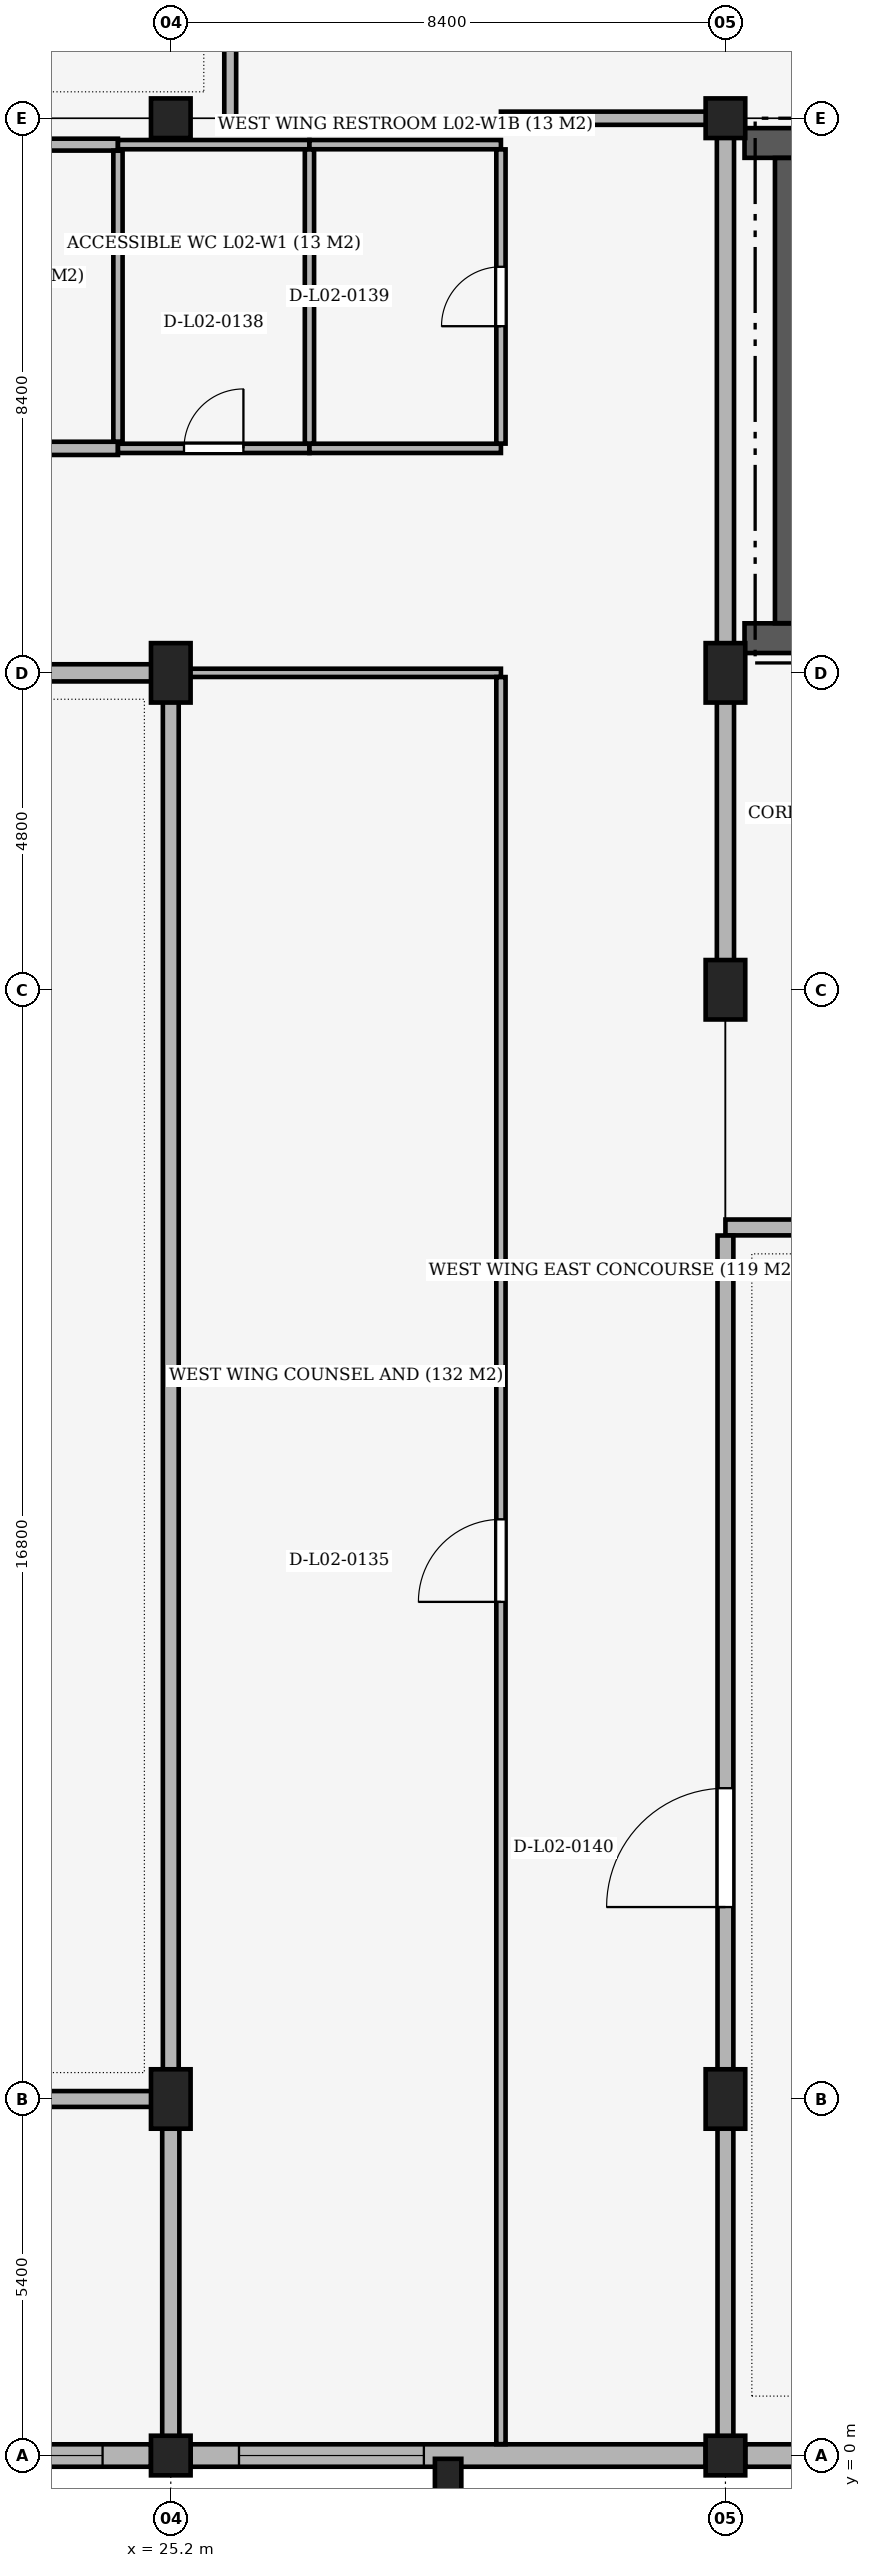
"""IFC4 building model, lengths in metres.
Left out: names, types, materials, properties, quantities, classifications, styles, units other than length and angle.
Written with IfcOpenShell. Run it as: python <this file> out.ifc"""

import sys

from ifc_helpers import new_model, si_unit, direction, frame, frame_2d, origin, origin_2d, place, context, subcontext, project, spatial, rectangle, extrude, element, fill, save


model = new_model("IFC4")
c1 = context("Model", 3, precision=1e-05, world=origin(), true_north=direction((0.0, 1.0)))
c2 = subcontext(c1, "Body", "Model", "MODEL_VIEW")
j1 = project(units=[si_unit("LENGTHUNIT", "METRE"), si_unit("PLANEANGLEUNIT", "RADIAN")], contexts=[c1])
p1 = place(None, origin())
s1 = spatial("IfcSite", under=j1, at=p1, CompositionType="ELEMENT")
p2 = place(p1, origin())
s2 = spatial("IfcBuilding", under=s1, at=p2, CompositionType="ELEMENT")
p3 = place(p2, frame((0.0, 0.0, 10.2)))
s3 = spatial("IfcBuildingStorey", under=s2, at=p3, CompositionType="ELEMENT", Elevation=10.2)
p4 = place(p3, frame((25.2, 0.0, 0.0), z_axis=(0.0, 0.0, 1.0), x_axis=(1.0, 0.0, 0.0)))
e1 = element("IfcColumn", 1, at=p4, inside=s3, PredefinedType="COLUMN", context=c2, shape_type="SweptSolid", body=[
    extrude(rectangle(XDim=0.6, YDim=0.6, at=origin_2d()), origin(), (0.0, 0.0, 1.0), 5.1),
])
for number, where, z_axis, x_axis in (
    (2, (25.2, 5.4, 0.0), (0.0, 0.0, 1.0), (1.0, 0.0, 0.0)),
    (3, (25.2, 27.0, 0.0), (0.0, 0.0, 1.0), (1.0, 0.0, 0.0)),
):
    element("IfcColumn", number, at=place(p3, frame(where, z_axis=z_axis, x_axis=x_axis)), inside=s3, PredefinedType="COLUMN", context=c2, shape_type="SweptSolid", body=[
        extrude(rectangle(XDim=0.6, YDim=0.9, at=origin_2d()), origin(), (0.0, 0.0, 1.0), 5.1),
    ])
for number, where, z_axis, x_axis in (
    (4, (25.2, 35.4, 0.0), (0.0, 0.0, 1.0), (1.0, 0.0, 0.0)),
    (5, (33.6, 0.0, 0.0), (0.0, 0.0, 1.0), (1.0, 0.0, 0.0)),
):
    element("IfcColumn", number, at=place(p3, frame(where, z_axis=z_axis, x_axis=x_axis)), inside=s3, PredefinedType="COLUMN", context=c2, shape_type="SweptSolid", body=[
        extrude(rectangle(XDim=0.6, YDim=0.6, at=origin_2d()), origin(), (0.0, 0.0, 1.0), 5.1),
    ])
for number, where, z_axis, x_axis in (
    (6, (33.6, 5.4, 0.0), (0.0, 0.0, 1.0), (1.0, 0.0, 0.0)),
    (7, (33.6, 22.2, 0.0), (0.0, 0.0, 1.0), (1.0, 0.0, 0.0)),
    (8, (33.6, 27.0, 0.0), (0.0, 0.0, 1.0), (1.0, 0.0, 0.0)),
):
    element("IfcColumn", number, at=place(p3, frame(where, z_axis=z_axis, x_axis=x_axis)), inside=s3, PredefinedType="COLUMN", context=c2, shape_type="SweptSolid", body=[
        extrude(rectangle(XDim=0.6, YDim=0.9, at=origin_2d()), origin(), (0.0, 0.0, 1.0), 5.1),
    ])
p5 = place(p3, frame((33.6, 35.4, 0.0), z_axis=(0.0, 0.0, 1.0), x_axis=(1.0, 0.0, 0.0)))
e9 = element("IfcColumn", 9, at=p5, inside=s3, PredefinedType="COLUMN", context=c2, shape_type="SweptSolid", body=[
    extrude(rectangle(XDim=0.6, YDim=0.6, at=origin_2d()), origin(), (0.0, 0.0, 1.0), 5.1),
])
p6 = place(p3, frame((29.4, -0.35, 0.0), z_axis=(0.0, 0.0, 1.0), x_axis=(1.0, 0.0, 0.0)))
e10 = element("IfcColumn", 10, at=p6, inside=s3, PredefinedType="PILASTER", context=c2, shape_type="SweptSolid", body=[
    extrude(rectangle(XDim=0.4, YDim=0.6, at=origin_2d()), origin(), (0.0, 0.0, 1.0), 5.1),
])
p7 = place(p3, frame((41.7, 0.0, 0.0), z_axis=(0.0, 0.0, 1.0), x_axis=(-1.0, 0.0, 0.0)))
e11 = element("IfcWall", 11, at=p7, inside=s3, PredefinedType="SOLIDWALL", context=c2, shape_type="SweptSolid", body=[
    extrude(rectangle(XDim=7.8, YDim=0.34, at=frame_2d((3.9, 0.0))), origin(), (0.0, 0.0, 1.0), 4.12),
])
p8 = place(p7, frame((2.3, 0.0, 0.75)))
e12 = element("IfcOpeningElement", 12, at=p8, cuts=e11, PredefinedType="OPENING", context=c2, shape_type="SweptSolid", body=[
    extrude(rectangle(XDim=3.2, YDim=2.6, at=frame_2d((1.6, 1.3))), frame((0.0, 0.185, 0.0), z_axis=(0.0, -1.0, 0.0), x_axis=(1.0, 0.0, 0.0)), (0.0, 0.0, 1.0), 0.37),
])
p9 = place(p3, frame((33.3, 0.0, 0.0), z_axis=(0.0, 0.0, 1.0), x_axis=(-1.0, 0.0, 0.0)))
e13 = element("IfcWall", 13, at=p9, inside=s3, PredefinedType="SOLIDWALL", context=c2, shape_type="SweptSolid", body=[
    extrude(rectangle(XDim=7.8, YDim=0.34, at=frame_2d((3.9, 0.0))), origin(), (0.0, 0.0, 1.0), 4.12),
])
p10 = place(p9, frame((4.267, 0.0, 0.75)))
e14 = element("IfcOpeningElement", 14, at=p10, cuts=e13, PredefinedType="OPENING", context=c2, shape_type="SweptSolid", body=[
    extrude(rectangle(XDim=2.8, YDim=2.6, at=frame_2d((1.4, 1.3))), frame((0.0, 0.185, 0.0), z_axis=(0.0, -1.0, 0.0), x_axis=(1.0, 0.0, 0.0)), (0.0, 0.0, 1.0), 0.37),
])
p11 = place(p3, frame((24.9, 0.0, 0.0), z_axis=(0.0, 0.0, 1.0), x_axis=(-1.0, 0.0, 0.0)))
e15 = element("IfcWall", 15, at=p11, inside=s3, PredefinedType="SOLIDWALL", context=c2, shape_type="SweptSolid", body=[
    extrude(rectangle(XDim=7.8, YDim=0.34, at=frame_2d((3.9, 0.0))), origin(), (0.0, 0.0, 1.0), 4.12),
])
p12 = place(p11, frame((0.733, 0.0, 0.75)))
e16 = element("IfcOpeningElement", 16, at=p12, cuts=e15, PredefinedType="OPENING", context=c2, shape_type="SweptSolid", body=[
    extrude(rectangle(XDim=2.8, YDim=2.6, at=frame_2d((1.4, 1.3))), frame((0.0, 0.185, 0.0), z_axis=(0.0, -1.0, 0.0), x_axis=(1.0, 0.0, 0.0)), (0.0, 0.0, 1.0), 0.37),
])
p13 = place(p11, frame((4.267, 0.0, 0.75)))
e17 = element("IfcOpeningElement", 17, at=p13, cuts=e15, PredefinedType="OPENING", context=c2, shape_type="SweptSolid", body=[
    extrude(rectangle(XDim=2.8, YDim=2.6, at=frame_2d((1.4, 1.3))), frame((0.0, 0.185, 0.0), z_axis=(0.0, -1.0, 0.0), x_axis=(1.0, 0.0, 0.0)), (0.0, 0.0, 1.0), 0.37),
])
p14 = place(p3, frame((33.889, 35.025, 0.0), z_axis=(0.0, 0.0, 1.0), x_axis=(1.0, 0.0, 0.0)))
e18 = element("IfcWall", 18, at=p14, inside=s3, PredefinedType="SHEAR", context=c2, shape_type="SweptSolid", body=[
    extrude(rectangle(XDim=4.761, YDim=0.45, at=frame_2d((2.38, 0.0))), origin(), (0.0, 0.0, 1.0), 4.82),
])
p15 = place(p3, frame((33.889, 27.525, 0.0), z_axis=(0.0, 0.0, 1.0), x_axis=(1.0, 0.0, 0.0)))
e19 = element("IfcWall", 19, at=p15, inside=s3, PredefinedType="SHEAR", context=c2, shape_type="SweptSolid", body=[
    extrude(rectangle(XDim=4.761, YDim=0.45, at=frame_2d((2.38, 0.0))), origin(), (0.0, 0.0, 1.0), 4.82),
])
p16 = place(p15, frame((2.011, 0.0, 0.0)))
e20 = element("IfcOpeningElement", 20, at=p16, cuts=e19, PredefinedType="OPENING", context=c2, shape_type="SweptSolid", body=[
    extrude(rectangle(XDim=1.2, YDim=2.2, at=frame_2d((0.6, 1.1))), frame((0.0, 0.24, 0.0), z_axis=(0.0, -1.0, 0.0), x_axis=(1.0, 0.0, 0.0)), (0.0, 0.0, 1.0), 0.48),
])
p17 = place(p3, frame((34.575, 27.752, 0.0), z_axis=(0.0, 0.0, 1.0), x_axis=(0.0, 1.0, 0.0)))
e21 = element("IfcWall", 21, at=p17, inside=s3, PredefinedType="SHEAR", context=c2, shape_type="SweptSolid", body=[
    extrude(rectangle(XDim=7.046, YDim=0.45, at=frame_2d((3.523, 0.0))), origin(), (0.0, 0.0, 1.0), 4.82),
])
p18 = place(p3, frame((8.4, 5.4, 0.0), z_axis=(0.0, 0.0, 1.0), x_axis=(1.0, 0.0, 0.0)))
e22 = element("IfcWall", 22, at=p18, inside=s3, PredefinedType="PARTITIONING", context=c2, shape_type="SweptSolid", body=[
    extrude(rectangle(XDim=16.8, YDim=0.24, at=frame_2d((8.4, 0.0))), origin(), (0.0, 0.0, 1.0), 3.57),
])
p19 = place(p18, frame((7.95, 0.0, 0.0)))
e23 = element("IfcOpeningElement", 23, at=p19, cuts=e22, PredefinedType="OPENING", context=c2, shape_type="SweptSolid", body=[
    extrude(rectangle(XDim=0.9, YDim=2.1, at=frame_2d((0.45, 1.05))), frame((0.0, 0.135, 0.0), z_axis=(0.0, -1.0, 0.0), x_axis=(1.0, 0.0, 0.0)), (0.0, 0.0, 1.0), 0.27),
])
p20 = place(p3, frame((33.6, 18.6, 0.0), z_axis=(0.0, 0.0, 1.0), x_axis=(1.0, 0.0, 0.0)))
e24 = element("IfcWall", 24, at=p20, inside=s3, PredefinedType="PARTITIONING", context=c2, shape_type="SweptSolid", body=[
    extrude(rectangle(XDim=16.8, YDim=0.24, at=frame_2d((8.4, 0.0))), origin(), (0.0, 0.0, 1.0), 3.77),
])
p21 = place(p3, frame((8.4, 27.0, 0.0), z_axis=(0.0, 0.0, 1.0), x_axis=(1.0, 0.0, 0.0)))
e25 = element("IfcWall", 25, at=p21, inside=s3, PredefinedType="PARTITIONING", context=c2, shape_type="SweptSolid", body=[
    extrude(rectangle(XDim=16.8, YDim=0.26, at=frame_2d((8.4, 0.0))), origin(), (0.0, 0.0, 1.0), 3.57),
])
p22 = place(p21, frame((7.4, 0.0, 0.0)))
e26 = element("IfcOpeningElement", 26, at=p22, cuts=e25, PredefinedType="OPENING", context=c2, shape_type="SweptSolid", body=[
    extrude(rectangle(XDim=2.0, YDim=2.5, at=frame_2d((1.0, 1.25))), frame((0.0, 0.145, 0.0), z_axis=(0.0, -1.0, 0.0), x_axis=(1.0, 0.0, 0.0)), (0.0, 0.0, 1.0), 0.29),
])
p23 = place(p3, frame((25.2, 27.0, 0.0), z_axis=(0.0, 0.0, 1.0), x_axis=(1.0, 0.0, 0.0)))
e27 = element("IfcWall", 27, at=p23, inside=s3, PredefinedType="PARTITIONING", context=c2, shape_type="SweptSolid", body=[
    extrude(rectangle(XDim=5.0, YDim=0.125, at=frame_2d((2.5, 0.0))), origin(), (0.0, 0.0, 1.0), 3.57),
])
p24 = place(p3, frame((16.6, 30.4, 0.0), z_axis=(0.0, 0.0, 1.0), x_axis=(1.0, 0.0, 0.0)))
e28 = element("IfcWall", 28, at=p24, inside=s3, PredefinedType="PARTITIONING", context=c2, shape_type="SweptSolid", body=[
    extrude(rectangle(XDim=7.8, YDim=0.2, at=frame_2d((3.9, 0.0))), origin(), (0.0, 0.0, 1.0), 4.82),
])
p25 = place(p24, frame((3.35, 0.0, 0.0)))
e29 = element("IfcOpeningElement", 29, at=p25, cuts=e28, PredefinedType="OPENING", context=c2, shape_type="SweptSolid", body=[
    extrude(rectangle(XDim=1.1, YDim=2.2, at=frame_2d((0.55, 1.1))), frame((0.0, 0.115, 0.0), z_axis=(0.0, -1.0, 0.0), x_axis=(1.0, 0.0, 0.0)), (0.0, 0.0, 1.0), 0.23),
])
p26 = place(p3, frame((24.4, 30.4, 0.0), z_axis=(0.0, 0.0, 1.0), x_axis=(1.0, 0.0, 0.0)))
e30 = element("IfcWall", 30, at=p26, inside=s3, PredefinedType="PARTITIONING", context=c2, shape_type="SweptSolid", body=[
    extrude(rectangle(XDim=2.9, YDim=0.14, at=frame_2d((1.45, 0.0))), origin(), (0.0, 0.0, 1.0), 4.12),
])
p27 = place(p26, frame((1.0, 0.0, 0.0)))
e31 = element("IfcOpeningElement", 31, at=p27, cuts=e30, PredefinedType="OPENING", context=c2, shape_type="SweptSolid", body=[
    extrude(rectangle(XDim=0.9, YDim=2.1, at=frame_2d((0.45, 1.05))), frame((0.0, 0.085, 0.0), z_axis=(0.0, -1.0, 0.0), x_axis=(1.0, 0.0, 0.0)), (0.0, 0.0, 1.0), 0.17),
])
p28 = place(p3, frame((27.3, 30.4, 0.0), z_axis=(0.0, 0.0, 1.0), x_axis=(1.0, 0.0, 0.0)))
e32 = element("IfcWall", 32, at=p28, inside=s3, PredefinedType="PARTITIONING", context=c2, shape_type="SweptSolid", body=[
    extrude(rectangle(XDim=2.9, YDim=0.14, at=frame_2d((1.45, 0.0))), origin(), (0.0, 0.0, 1.0), 4.82),
])
p29 = place(p3, frame((16.6, 35.0, 0.0), z_axis=(0.0, 0.0, 1.0), x_axis=(1.0, 0.0, 0.0)))
e33 = element("IfcWall", 33, at=p29, inside=s3, PredefinedType="PARTITIONING", context=c2, shape_type="SweptSolid", body=[
    extrude(rectangle(XDim=7.8, YDim=0.18, at=frame_2d((3.9, 0.0))), origin(), (0.0, 0.0, 1.0), 4.82),
])
p30 = place(p3, frame((24.4, 35.0, 0.0), z_axis=(0.0, 0.0, 1.0), x_axis=(1.0, 0.0, 0.0)))
e34 = element("IfcWall", 34, at=p30, inside=s3, PredefinedType="PARTITIONING", context=c2, shape_type="SweptSolid", body=[
    extrude(rectangle(XDim=2.9, YDim=0.14, at=frame_2d((1.45, 0.0))), origin(), (0.0, 0.0, 1.0), 4.12),
])
p31 = place(p3, frame((27.3, 35.0, 0.0), z_axis=(0.0, 0.0, 1.0), x_axis=(1.0, 0.0, 0.0)))
e35 = element("IfcWall", 35, at=p31, inside=s3, PredefinedType="PARTITIONING", context=c2, shape_type="SweptSolid", body=[
    extrude(rectangle(XDim=2.9, YDim=0.14, at=frame_2d((1.45, 0.0))), origin(), (0.0, 0.0, 1.0), 4.82),
])
p32 = place(p3, frame((30.2, 35.4, 0.0), z_axis=(0.0, 0.0, 1.0), x_axis=(1.0, 0.0, 0.0)))
e36 = element("IfcWall", 36, at=p32, inside=s3, PredefinedType="PARTITIONING", context=c2, shape_type="SweptSolid", body=[
    extrude(rectangle(XDim=3.4, YDim=0.2, at=frame_2d((1.7, 0.0))), origin(), (0.0, 0.0, 1.0), 4.12),
])
p33 = place(p3, frame((24.4, 30.502, 0.0), z_axis=(0.0, 0.0, 1.0), x_axis=(0.0, 1.0, 0.0)))
e37 = element("IfcWall", 37, at=p33, inside=s3, PredefinedType="PARTITIONING", context=c2, shape_type="SweptSolid", body=[
    extrude(rectangle(XDim=4.406, YDim=0.14, at=frame_2d((2.203, 0.0))), origin(), (0.0, 0.0, 1.0), 4.82),
])
p34 = place(p3, frame((25.2, -0.064, 0.0), z_axis=(0.0, 0.0, 1.0), x_axis=(0.0, 1.0, 0.0)))
e38 = element("IfcWall", 38, at=p34, inside=s3, PredefinedType="PARTITIONING", context=c2, shape_type="SweptSolid", body=[
    extrude(rectangle(XDim=5.342, YDim=0.26, at=frame_2d((2.671, 0.0))), origin(), (0.0, 0.0, 1.0), 3.67),
])
p35 = place(p3, frame((25.2, 5.522, 0.0), z_axis=(0.0, 0.0, 1.0), x_axis=(0.0, 1.0, 0.0)))
e39 = element("IfcWall", 39, at=p35, inside=s3, PredefinedType="PARTITIONING", context=c2, shape_type="SweptSolid", body=[
    extrude(rectangle(XDim=21.346, YDim=0.24, at=frame_2d((10.673, 0.0))), origin(), (0.0, 0.0, 1.0), 3.57),
])
p36 = place(p3, frame((26.1, 35.4, 0.0), z_axis=(0.0, 0.0, 1.0), x_axis=(0.0, 1.0, 0.0)))
e40 = element("IfcWall", 40, at=p36, inside=s3, PredefinedType="PARTITIONING", context=c2, shape_type="SweptSolid", body=[
    extrude(rectangle(XDim=3.668, YDim=0.18, at=frame_2d((1.834, 0.0))), origin(), (0.0, 0.0, 1.0), 4.12),
])
p37 = place(p3, frame((27.3, 30.472, 0.0), z_axis=(0.0, 0.0, 1.0), x_axis=(0.0, 1.0, 0.0)))
e41 = element("IfcWall", 41, at=p37, inside=s3, PredefinedType="PARTITIONING", context=c2, shape_type="SweptSolid", body=[
    extrude(rectangle(XDim=4.456, YDim=0.14, at=frame_2d((2.228, 0.0))), origin(), (0.0, 0.0, 1.0), 4.37),
])
p38 = place(p3, frame((30.2, 0.172, 0.0), z_axis=(0.0, 0.0, 1.0), x_axis=(0.0, 1.0, 0.0)))
e42 = element("IfcWall", 42, at=p38, inside=s3, PredefinedType="PARTITIONING", context=c2, shape_type="SweptSolid", body=[
    extrude(rectangle(XDim=26.764, YDim=0.14, at=frame_2d((13.382, 0.0))), origin(), (0.0, 0.0, 1.0), 4.12),
])
p39 = place(p38, frame((12.757, 0.0, 0.0)))
e43 = element("IfcOpeningElement", 43, at=p39, cuts=e42, PredefinedType="OPENING", context=c2, shape_type="SweptSolid", body=[
    extrude(rectangle(XDim=1.25, YDim=2.2, at=frame_2d((0.625, 1.1))), frame((0.0, 0.085, 0.0), z_axis=(0.0, -1.0, 0.0), x_axis=(1.0, 0.0, 0.0)), (0.0, 0.0, 1.0), 0.17),
])
p40 = place(p3, frame((30.2, 30.472, 0.0), z_axis=(0.0, 0.0, 1.0), x_axis=(0.0, 1.0, 0.0)))
e44 = element("IfcWall", 44, at=p40, inside=s3, PredefinedType="PARTITIONING", context=c2, shape_type="SweptSolid", body=[
    extrude(rectangle(XDim=4.456, YDim=0.14, at=frame_2d((2.228, 0.0))), origin(), (0.0, 0.0, 1.0), 4.37),
])
p41 = place(p40, frame((1.778, 0.0, 0.0)))
e45 = element("IfcOpeningElement", 45, at=p41, cuts=e44, PredefinedType="OPENING", context=c2, shape_type="SweptSolid", body=[
    extrude(rectangle(XDim=0.9, YDim=2.1, at=frame_2d((0.45, 1.05))), frame((0.0, 0.085, 0.0), z_axis=(0.0, -1.0, 0.0), x_axis=(1.0, 0.0, 0.0)), (0.0, 0.0, 1.0), 0.17),
])
p42 = place(p3, frame((33.6, 22.2, 0.0), z_axis=(0.0, 0.0, 1.0), x_axis=(0.0, 1.0, 0.0)))
e46 = element("IfcWall", 46, at=p42, inside=s3, PredefinedType="PARTITIONING", context=c2, shape_type="SweptSolid", body=[
    extrude(rectangle(XDim=13.098, YDim=0.26, at=frame_2d((6.549, 0.0))), origin(), (0.0, 0.0, 1.0), 4.12),
])
p43 = place(p3, frame((33.6, -0.064, 0.0), z_axis=(0.0, 0.0, 1.0), x_axis=(0.0, 1.0, 0.0)))
e47 = element("IfcWall", 47, at=p43, inside=s3, PredefinedType="PARTITIONING", context=c2, shape_type="SweptSolid", body=[
    extrude(rectangle(XDim=18.542, YDim=0.24, at=frame_2d((9.271, 0.0))), origin(), (0.0, 0.0, 1.0), 3.77),
])
p44 = place(p43, frame((8.371, 0.0, 0.0)))
e48 = element("IfcOpeningElement", 48, at=p44, cuts=e47, PredefinedType="OPENING", context=c2, shape_type="SweptSolid", body=[
    extrude(rectangle(XDim=1.8, YDim=2.4, at=frame_2d((0.9, 1.2))), frame((0.0, 0.135, 0.0), z_axis=(0.0, -1.0, 0.0), x_axis=(1.0, 0.0, 0.0)), (0.0, 0.0, 1.0), 0.27),
])
p45 = place(p10, origin())
e49 = element("IfcWindow", 49, at=p45, inside=s3, PartitioningType="SINGLE_PANEL", PredefinedType="WINDOW", context=c2, shape_type="SweptSolid", body=[
    extrude(rectangle(XDim=2.8, YDim=2.6, at=frame_2d((1.4, 1.3))), frame((0.0, 0.03, 0.0), z_axis=(0.0, -1.0, 0.0), x_axis=(1.0, 0.0, 0.0)), (0.0, 0.0, 1.0), 0.06),
])
fill(e14, e49)
p46 = place(p12, origin())
e50 = element("IfcWindow", 50, at=p46, inside=s3, PartitioningType="SINGLE_PANEL", PredefinedType="WINDOW", context=c2, shape_type="SweptSolid", body=[
    extrude(rectangle(XDim=2.8, YDim=2.6, at=frame_2d((1.4, 1.3))), frame((0.0, 0.03, 0.0), z_axis=(0.0, -1.0, 0.0), x_axis=(1.0, 0.0, 0.0)), (0.0, 0.0, 1.0), 0.06),
])
fill(e16, e50)
p47 = place(p39, origin())
e51 = element("IfcDoor", 51, at=p47, inside=s3, OperationType="SINGLE_SWING_LEFT", PredefinedType="DOOR", context=c2, shape_type="SweptSolid", body=[
    extrude(rectangle(XDim=1.25, YDim=2.2, at=frame_2d((0.625, 1.1))), frame((0.0, 0.025, 0.0), z_axis=(0.0, -1.0, 0.0), x_axis=(1.0, 0.0, 0.0)), (0.0, 0.0, 1.0), 0.05),
])
fill(e43, e51)
p48 = place(p27, origin())
e52 = element("IfcDoor", 52, at=p48, inside=s3, OperationType="SINGLE_SWING_RIGHT", PredefinedType="DOOR", context=c2, shape_type="SweptSolid", body=[
    extrude(rectangle(XDim=0.9, YDim=2.1, at=frame_2d((0.45, 1.05))), frame((0.0, 0.025, 0.0), z_axis=(0.0, -1.0, 0.0), x_axis=(1.0, 0.0, 0.0)), (0.0, 0.0, 1.0), 0.05),
])
fill(e31, e52)
p49 = place(p41, origin())
e53 = element("IfcDoor", 53, at=p49, inside=s3, OperationType="SINGLE_SWING_LEFT", PredefinedType="DOOR", context=c2, shape_type="SweptSolid", body=[
    extrude(rectangle(XDim=0.9, YDim=2.1, at=frame_2d((0.45, 1.05))), frame((0.0, 0.025, 0.0), z_axis=(0.0, -1.0, 0.0), x_axis=(1.0, 0.0, 0.0)), (0.0, 0.0, 1.0), 0.05),
])
fill(e45, e53)
p50 = place(p44, origin())
e54 = element("IfcDoor", 54, at=p50, inside=s3, OperationType="SINGLE_SWING_LEFT", PredefinedType="DOOR", context=c2, shape_type="SweptSolid", body=[
    extrude(rectangle(XDim=1.8, YDim=2.4, at=frame_2d((0.9, 1.2))), frame((0.0, 0.025, 0.0), z_axis=(0.0, -1.0, 0.0), x_axis=(1.0, 0.0, 0.0)), (0.0, 0.0, 1.0), 0.05),
])
fill(e48, e54)
save(model, sys.argv[1])
